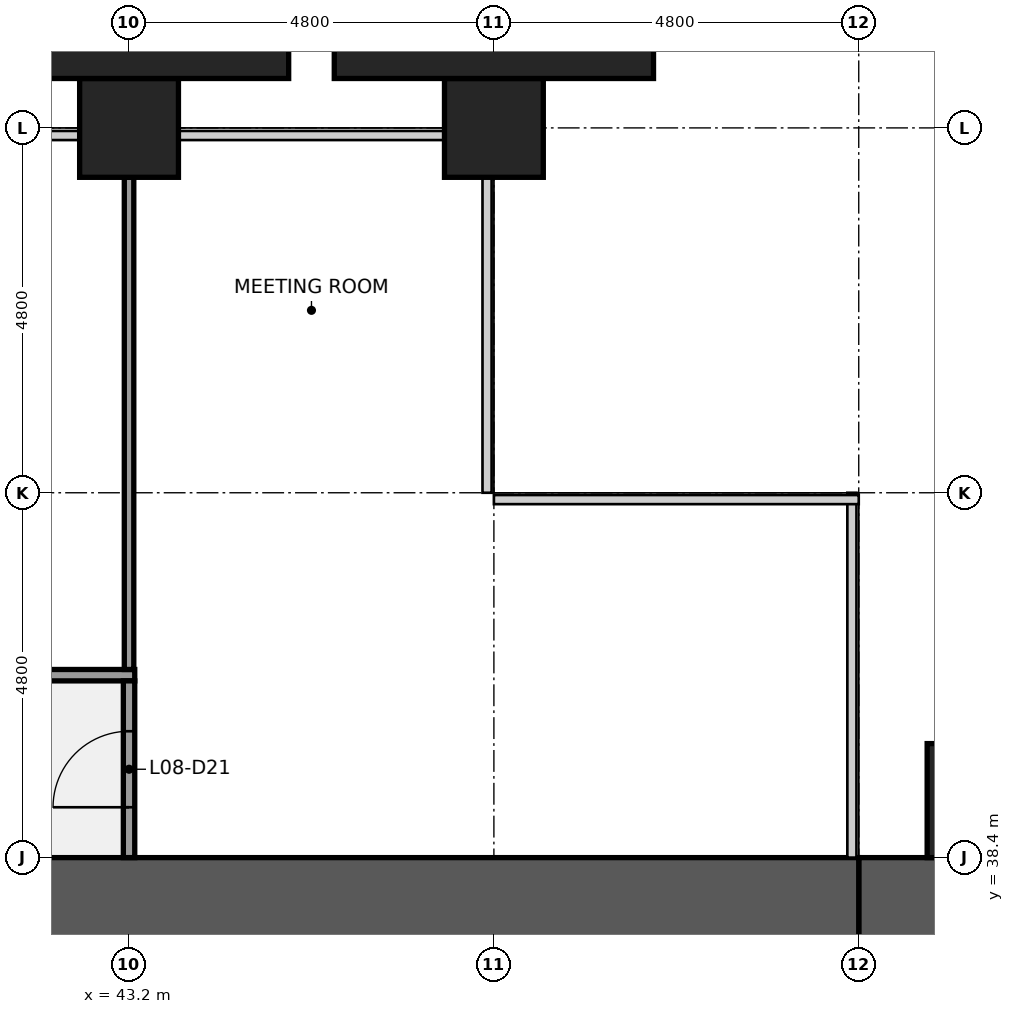
"""IFC4 building model, lengths in metres.
Left out: names, types, materials, properties, quantities, classifications, styles, units other than length and angle.
Written with IfcOpenShell. Run it as: python <this file> out.ifc"""

import sys

from ifc_helpers import new_model, si_unit, direction, frame, frame_2d, origin, origin_2d, place, context, subcontext, project, spatial, rectangle, extrude, element, fill, save


model = new_model("IFC4")
c1 = context("Model", 3, precision=1e-05, world=origin(), true_north=direction((0.0, 1.0)))
c2 = subcontext(c1, "Body", "Model", "MODEL_VIEW")
j1 = project(units=[si_unit("LENGTHUNIT", "METRE"), si_unit("PLANEANGLEUNIT", "RADIAN")], contexts=[c1])
p1 = place(None, origin())
s1 = spatial("IfcSite", under=j1, at=p1, CompositionType="ELEMENT")
p2 = place(p1, origin())
s2 = spatial("IfcBuilding", under=s1, at=p2, CompositionType="ELEMENT")
p3 = place(p2, frame((0.0, 0.0, 43.0)))
s3 = spatial("IfcBuildingStorey", under=s2, at=p3, CompositionType="ELEMENT", Elevation=43.0)
for number, where, z_axis, x_axis in (
    (1, (43.2, 48.0, 0.0), (0.0, 0.0, 1.0), (1.0, 0.0, 0.0)),
    (2, (48.0, 48.0, 0.0), (0.0, 0.0, 1.0), (1.0, 0.0, 0.0)),
):
    element("IfcColumn", number, at=place(p3, frame(where, z_axis=z_axis, x_axis=x_axis)), inside=s3, PredefinedType="COLUMN", context=c2, shape_type="SweptSolid", body=[
        extrude(rectangle(XDim=1.3, YDim=1.3, at=origin_2d()), origin(), (0.0, 0.0, 1.0), 4.0),
    ])
p4 = place(p3, frame((52.8, 37.8, 0.0), z_axis=(0.0, 0.0, 1.0), x_axis=(1.0, 0.0, 0.0)))
e3 = element("IfcWall", 3, at=p4, inside=s3, PredefinedType="SHEAR", context=c2, shape_type="SweptSolid", body=[
    extrude(rectangle(XDim=3.6, YDim=1.2, at=frame_2d((1.8, 0.0))), origin(), (0.0, 0.0, 1.0), 3.84),
])
p5 = place(p3, frame((39.6, 37.8, 0.0), z_axis=(0.0, 0.0, 1.0), x_axis=(1.0, 0.0, 0.0)))
e4 = element("IfcWall", 4, at=p5, inside=s3, PredefinedType="SHEAR", context=c2, shape_type="SweptSolid", body=[
    extrude(rectangle(XDim=13.2, YDim=1.2, at=frame_2d((6.6, 0.0))), origin(), (0.0, 0.0, 1.0), 3.84),
])
p6 = place(p5, frame((0.65, 0.0, 0.0)))
e5 = element("IfcOpeningElement", 5, at=p6, cuts=e4, PredefinedType="OPENING", context=c2, shape_type="SweptSolid", body=[
    extrude(rectangle(XDim=1.1, YDim=2.1, at=frame_2d((0.55, 1.05))), frame((0.0, 0.61, 0.0), z_axis=(0.0, -1.0, 0.0), x_axis=(1.0, 0.0, 0.0)), (0.0, 0.0, 1.0), 1.22),
])
p7 = place(p3, frame((38.325, 40.8, 0.0), z_axis=(0.0, 0.0, 1.0), x_axis=(1.0, 0.0, 0.0)))
e6 = element("IfcWall", 6, at=p7, inside=s3, PredefinedType="PARTITIONING", context=c2, shape_type="SweptSolid", body=[
    extrude(rectangle(XDim=4.95, YDim=0.15, at=frame_2d((2.475, 0.0))), origin(), (0.0, 0.0, 1.0), 2.849),
])
p8 = place(p7, frame((1.975, 0.0, 0.0)))
e7 = element("IfcOpeningElement", 7, at=p8, cuts=e6, PredefinedType="OPENING", context=c2, shape_type="SweptSolid", body=[
    extrude(rectangle(XDim=1.0, YDim=2.1, at=frame_2d((0.5, 1.05))), frame((0.0, 0.085, 0.0), z_axis=(0.0, -1.0, 0.0), x_axis=(1.0, 0.0, 0.0)), (0.0, 0.0, 1.0), 0.17),
])
p9 = place(p3, frame((43.2, 40.875, 0.0), z_axis=(0.0, 0.0, 1.0), x_axis=(0.0, 1.0, 0.0)))
e8 = element("IfcWall", 8, at=p9, inside=s3, PredefinedType="PARTITIONING", context=c2, shape_type="SweptSolid", body=[
    extrude(rectangle(XDim=6.475, YDim=0.125, at=frame_2d((3.238, 0.0))), origin(), (0.0, 0.0, 1.0), 2.849),
])
p10 = place(p3, frame((43.2, 38.4, 0.0), z_axis=(0.0, 0.0, 1.0), x_axis=(0.0, 1.0, 0.0)))
e9 = element("IfcWall", 9, at=p10, inside=s3, PredefinedType="PARTITIONING", context=c2, shape_type="SweptSolid", body=[
    extrude(rectangle(XDim=2.325, YDim=0.15, at=frame_2d((1.163, 0.0))), origin(), (0.0, 0.0, 1.0), 2.849),
])
p11 = place(p10, frame((0.663, 0.0, 0.0)))
e10 = element("IfcOpeningElement", 10, at=p11, cuts=e9, PredefinedType="OPENING", context=c2, shape_type="SweptSolid", body=[
    extrude(rectangle(XDim=1.0, YDim=2.1, at=frame_2d((0.5, 1.05))), frame((0.0, 0.085, 0.0), z_axis=(0.0, -1.0, 0.0), x_axis=(1.0, 0.0, 0.0)), (0.0, 0.0, 1.0), 0.17),
])
p12 = place(p3, frame((55.2, 39.15, 0.0), z_axis=(0.0, 0.0, 1.0), x_axis=(1.0, 0.0, 0.0)))
e11 = element("IfcColumn", 11, at=p12, inside=s3, PredefinedType="PILASTER", context=c2, shape_type="SweptSolid", body=[
    extrude(rectangle(XDim=3.0, YDim=1.5, at=origin_2d()), origin(), (0.0, 0.0, 1.0), 4.0),
])
for number, where, z_axis, x_axis in (
    (12, (43.2, 49.075, 0.0), (0.0, 0.0, 1.0), (1.0, 0.0, 0.0)),
    (13, (48.0, 49.075, 0.0), (0.0, 0.0, 1.0), (1.0, 0.0, 0.0)),
):
    element("IfcColumn", number, at=place(p3, frame(where, z_axis=z_axis, x_axis=x_axis)), inside=s3, PredefinedType="PILASTER", context=c2, shape_type="SweptSolid", body=[
        extrude(rectangle(XDim=4.2, YDim=0.85, at=origin_2d()), origin(), (0.0, 0.0, 1.0), 4.0),
    ])
p13 = place(p11, origin())
e14 = element("IfcDoor", 14, at=p13, inside=s3, OperationType="SINGLE_SWING_LEFT", PredefinedType="DOOR", context=c2, shape_type="SweptSolid", body=[
    extrude(rectangle(XDim=1.0, YDim=2.1, at=frame_2d((0.5, 1.05))), frame((0.0, 0.025, 0.0), z_axis=(0.0, -1.0, 0.0), x_axis=(1.0, 0.0, 0.0)), (0.0, 0.0, 1.0), 0.05),
])
fill(e10, e14)
save(model, sys.argv[1])
